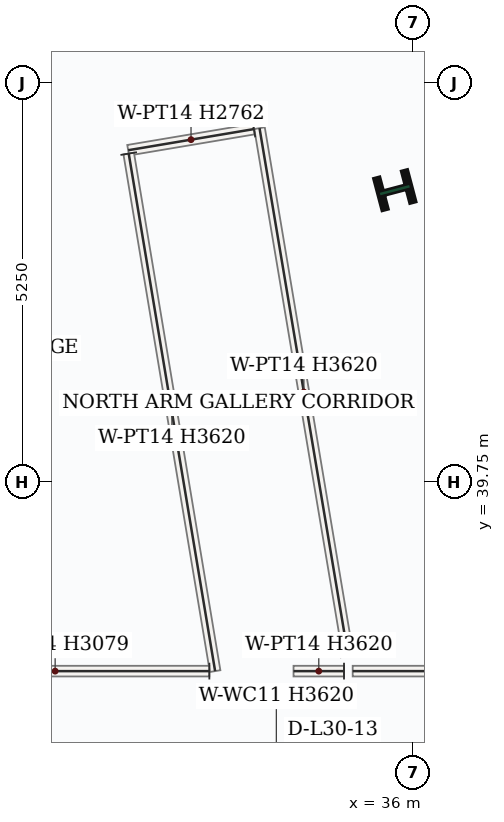
"""IFC4 building model, lengths in metres.
Left out: names, types, materials, properties, quantities, classifications, styles, units other than length and angle.
Written with IfcOpenShell. Run it as: python <this file> out.ifc"""

import sys

from ifc_helpers import new_model, si_unit, direction, frame, frame_2d, origin, origin_2d, place, context, subcontext, project, spatial, rectangle, i_section, extrude, source, transform, mapped, element, save


model = new_model("IFC4")
c1 = context("Model", 3, precision=1e-05, world=origin(), true_north=direction((0.0, 1.0)))
c2 = subcontext(c1, "Body", "Model", "MODEL_VIEW")
j1 = project(units=[si_unit("LENGTHUNIT", "METRE"), si_unit("PLANEANGLEUNIT", "RADIAN")], contexts=[c1])
p1 = place(None, origin())
s1 = spatial("IfcSite", under=j1, at=p1, CompositionType="ELEMENT")
p2 = place(p1, origin())
s2 = spatial("IfcBuilding", under=s1, at=p2, CompositionType="ELEMENT")
p3 = place(p2, frame((0.0, 0.0, 135.6)))
s3 = spatial("IfcBuildingStorey", under=s2, at=p3, CompositionType="ELEMENT", Elevation=135.6)
m1 = source(origin(), c2, "Body", "SweptSolid", [
    extrude(i_section(OverallWidth=0.412, OverallDepth=0.435, WebThickness=0.036, FlangeThickness=0.057, FilletRadius=0.018, at=origin_2d()), origin(), (0.0, 0.0, 1.0), 3.9),
])
p4 = place(p3, frame((35.755, 43.588, 0.0), z_axis=(0.0, 0.0, 1.0), x_axis=(-0.255445757936, 0.966823388604, 0.0)))
e1 = element("IfcColumn", 1, at=p4, inside=s3, PredefinedType="COLUMN", context=c2, shape_type="MappedRepresentation", body=[
    mapped(m1, transform((0.0, 0.0, 0.0), x_axis=(1.0, 0.0, 0.0), y_axis=(0.0, 1.0, 0.0), z_axis=(0.0, 0.0, 1.0), scale=1.0)),
])
p5 = place(p3, frame((42.742, 37.26, 0.0), z_axis=(0.0, 0.0, 1.0), x_axis=(-0.999999999476, 3.2371888e-05, 0.0)))
e2 = element("IfcWall", 2, at=p5, inside=s3, PredefinedType="PARTITIONING", context=c2, shape_type="SweptSolid", body=[
    extrude(rectangle(XDim=7.542, YDim=0.14, at=frame_2d((3.771, 0.0))), origin(), (0.0, 0.0, 1.0), 3.62),
])
p6 = place(p5, frame((5.142, 0.0, 0.0)))
e3 = element("IfcOpeningElement", 3, at=p6, cuts=e2, PredefinedType="OPENING", context=c2, shape_type="SweptSolid", body=[
    extrude(rectangle(XDim=0.95, YDim=2.15, at=frame_2d((0.475, 1.075))), frame((0.0, 0.08, 0.0), z_axis=(0.0, -1.0, 0.0), x_axis=(1.0, 0.0, 0.0)), (0.0, 0.0, 1.0), 0.16),
])
m2 = source(origin(), c2, "Body", "SweptSolid", [
    extrude(rectangle(XDim=0.664, YDim=0.14, at=frame_2d((0.332, 0.0))), origin(), (0.0, 0.0, 1.0), 3.62),
])
p7 = place(p3, frame((35.086, 37.26, 0.0), z_axis=(0.0, 0.0, 1.0), x_axis=(-1.0, 0.0, 0.0)))
e4 = element("IfcWall", 4, at=p7, inside=s3, PredefinedType="PARTITIONING", context=c2, shape_type="MappedRepresentation", body=[
    mapped(m2, transform((0.0, 0.0, 0.0), x_axis=(1.0, 0.0, 0.0), y_axis=(0.0, 1.0, 0.0), z_axis=(0.0, 0.0, 1.0), scale=1.0)),
])
m3 = source(origin(), c2, "Body", "SweptSolid", [
    extrude(rectangle(XDim=7.041, YDim=0.14, at=frame_2d((3.521, 0.0))), origin(), (0.0, 0.0, 1.0), 3.62),
])
p8 = place(p3, frame((35.142, 37.459, 0.0), z_axis=(0.0, 0.0, 1.0), x_axis=(-0.165703306215, 0.98617565084, 0.0)))
e5 = element("IfcWall", 5, at=p8, inside=s3, PredefinedType="PARTITIONING", context=c2, shape_type="MappedRepresentation", body=[
    mapped(m3, transform((0.0, 0.0, 0.0), x_axis=(1.0, 0.0, 0.0), y_axis=(0.0, 1.0, 0.0), z_axis=(0.0, 0.0, 1.0), scale=1.0)),
])
m4 = source(origin(), c2, "Body", "SweptSolid", [
    extrude(rectangle(XDim=1.677, YDim=0.14, at=frame_2d((0.839, 0.0))), origin(), (0.0, 0.0, 1.0), 2.762),
])
p9 = place(p3, frame((33.901, 44.391, 0.0), z_axis=(0.0, 0.0, 1.0), x_axis=(-0.986164833546, -0.165767671991, 0.0)))
e6 = element("IfcWall", 6, at=p9, inside=s3, PredefinedType="PARTITIONING", context=c2, shape_type="MappedRepresentation", body=[
    mapped(m4, transform((0.0, 0.0, 0.0), x_axis=(1.0, 0.0, 0.0), y_axis=(0.0, 1.0, 0.0), z_axis=(0.0, 0.0, 1.0), scale=1.0)),
])
m5 = source(origin(), c2, "Body", "SweptSolid", [
    extrude(rectangle(XDim=6.903, YDim=0.14, at=frame_2d((3.451, 0.0))), origin(), (0.0, 0.0, 1.0), 3.62),
])
p10 = place(p3, frame((32.254, 44.069, 0.0), z_axis=(0.0, 0.0, 1.0), x_axis=(0.164708688009, -0.986342257076, 0.0)))
e7 = element("IfcWall", 7, at=p10, inside=s3, PredefinedType="PARTITIONING", context=c2, shape_type="MappedRepresentation", body=[
    mapped(m5, transform((0.0, 0.0, 0.0), x_axis=(1.0, 0.0, 0.0), y_axis=(0.0, 1.0, 0.0), z_axis=(0.0, 0.0, 1.0), scale=1.0)),
])
m6 = source(origin(), c2, "Body", "SweptSolid", [
    extrude(rectangle(XDim=4.057, YDim=0.14, at=frame_2d((2.029, 0.0))), origin(), (0.0, 0.0, 1.0), 3.079),
])
p11 = place(p3, frame((33.315, 37.26, 0.0), z_axis=(0.0, 0.0, 1.0), x_axis=(-0.999999998189, -6.0175713e-05, 0.0)))
e8 = element("IfcWall", 8, at=p11, inside=s3, PredefinedType="PARTITIONING", context=c2, shape_type="MappedRepresentation", body=[
    mapped(m6, transform((0.0, 0.0, 0.0), x_axis=(1.0, 0.0, 0.0), y_axis=(0.0, 1.0, 0.0), z_axis=(0.0, 0.0, 1.0), scale=1.0)),
])
save(model, sys.argv[1])
